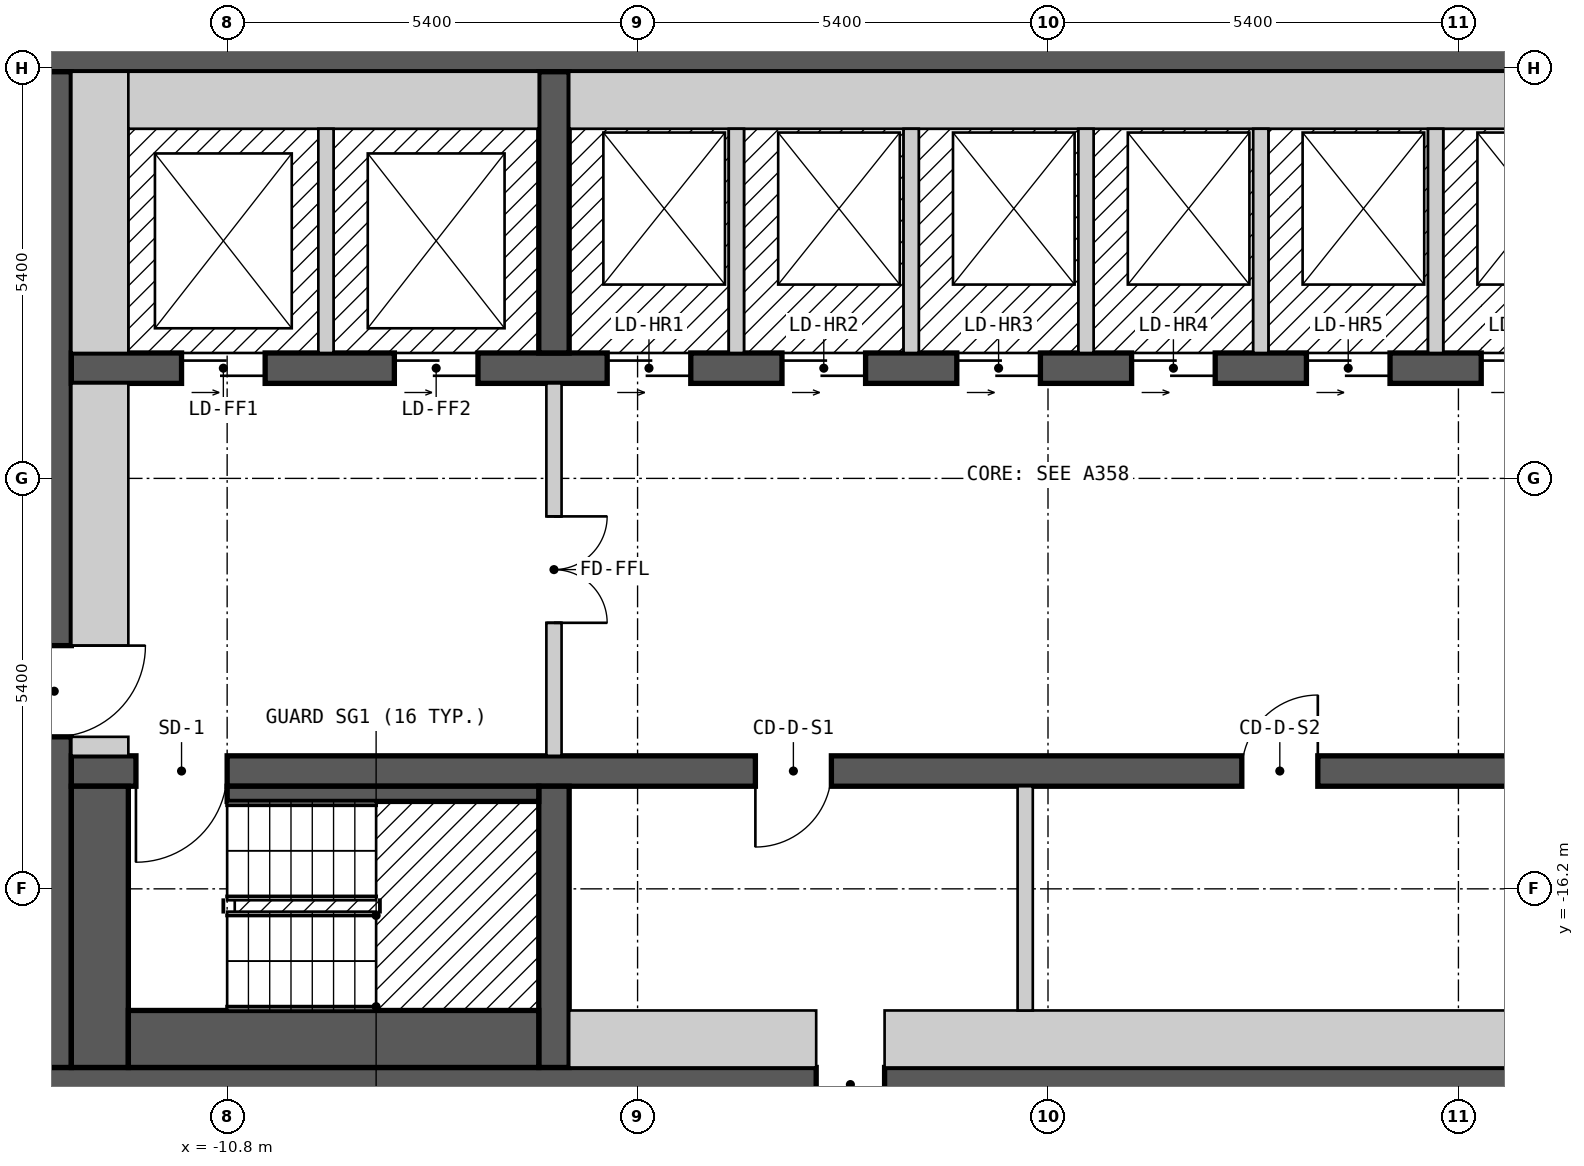
"""IFC4 building model, lengths in metres.
Left out: names, types, materials, properties, quantities, classifications, styles, units other than length and angle.
Written with IfcOpenShell. Run it as: python <this file> out.ifc"""

import sys

from ifc_helpers import new_model, si_unit, direction, frame, frame_2d, origin, place, context, subcontext, project, spatial, polyline, rectangle, outline, extrude, element, fill, save


model = new_model("IFC4")
c1 = context("Model", 3, precision=1e-05, world=origin(), true_north=direction((0.0, 1.0)))
c2 = subcontext(c1, "Body", "Model", "MODEL_VIEW")
j1 = project(units=[si_unit("LENGTHUNIT", "METRE"), si_unit("PLANEANGLEUNIT", "RADIAN")], contexts=[c1])
p1 = place(None, origin())
s1 = spatial("IfcSite", under=j1, at=p1, CompositionType="ELEMENT")
p2 = place(p1, origin())
s2 = spatial("IfcBuilding", under=s1, at=p2, CompositionType="ELEMENT")
p3 = place(p2, frame((0.0, 0.0, 211.8)))
s3 = spatial("IfcBuildingStorey", under=s2, at=p3, CompositionType="ELEMENT", Elevation=211.8)
p4 = place(p3, frame((-13.3, -18.775, 0.0), z_axis=(0.0, 0.0, 1.0), x_axis=(1.0, 0.0, 0.0)))
e1 = element("IfcWall", 1, at=p4, inside=s3, PredefinedType="SHEAR", context=c2, shape_type="SweptSolid", body=[
    extrude(rectangle(XDim=26.6, YDim=0.45, at=frame_2d((13.3, 0.0))), origin(), (0.0, 0.0, 1.0), 2.7),
])
p5 = place(p4, frame((10.25, 0.0, 0.0)))
e2 = element("IfcOpeningElement", 2, at=p5, cuts=e1, PredefinedType="OPENING", context=c2, shape_type="SweptSolid", body=[
    extrude(rectangle(XDim=0.9, YDim=2.1, at=frame_2d((0.45, 1.05))), frame((0.0, 0.235, 0.0), z_axis=(0.0, -1.0, 0.0), x_axis=(1.0, 0.0, 0.0)), (0.0, 0.0, 1.0), 0.47),
])
p6 = place(p3, frame((-13.3, -5.225, 0.0), z_axis=(0.0, 0.0, 1.0), x_axis=(1.0, 0.0, 0.0)))
e3 = element("IfcWall", 3, at=p6, inside=s3, PredefinedType="SHEAR", context=c2, shape_type="SweptSolid", body=[
    extrude(rectangle(XDim=26.6, YDim=0.45, at=frame_2d((13.3, 0.0))), origin(), (0.0, 0.0, 1.0), 2.7),
])
p7 = place(p6, frame((23.65, 0.0, 0.0)))
e4 = element("IfcOpeningElement", 4, at=p7, cuts=e3, PredefinedType="OPENING", context=c2, shape_type="SweptSolid", body=[
    extrude(rectangle(XDim=1.2, YDim=2.1, at=frame_2d((0.6, 1.05))), frame((0.0, 0.235, 0.0), z_axis=(0.0, -1.0, 0.0), x_axis=(1.0, 0.0, 0.0)), (0.0, 0.0, 1.0), 0.47),
])
p8 = place(p3, frame((-13.075, -18.55, 0.0), z_axis=(0.0, 0.0, 1.0), x_axis=(0.0, 1.0, 0.0)))
e5 = element("IfcWall", 5, at=p8, inside=s3, PredefinedType="SHEAR", context=c2, shape_type="SweptSolid", body=[
    extrude(rectangle(XDim=13.1, YDim=0.45, at=frame_2d((6.55, 0.0))), origin(), (0.0, 0.0, 1.0), 2.7),
])
p9 = place(p8, frame((4.35, 0.0, 0.0)))
e6 = element("IfcOpeningElement", 6, at=p9, cuts=e5, PredefinedType="OPENING", context=c2, shape_type="SweptSolid", body=[
    extrude(rectangle(XDim=1.2, YDim=2.1, at=frame_2d((0.6, 1.05))), frame((0.0, 0.235, 0.0), z_axis=(0.0, -1.0, 0.0), x_axis=(1.0, 0.0, 0.0)), (0.0, 0.0, 1.0), 0.47),
])
p10 = place(p3, frame((-12.85, -14.65, 0.0), z_axis=(0.0, 0.0, 1.0), x_axis=(1.0, 0.0, 0.0)))
e7 = element("IfcWall", 7, at=p10, inside=s3, PredefinedType="SHEAR", context=c2, shape_type="SweptSolid", body=[
    extrude(rectangle(XDim=25.7, YDim=0.4, at=frame_2d((12.85, 0.0))), origin(), (0.0, 0.0, 1.0), 2.7),
])
p11 = place(p10, frame((2.05, 0.0, 0.0), z_axis=(0.0, 0.0, 1.0), x_axis=(-1.0, 0.0, 0.0)))
e8 = element("IfcOpeningElement", 8, at=p11, cuts=e7, PredefinedType="OPENING", context=c2, shape_type="SweptSolid", body=[
    extrude(rectangle(XDim=1.2, YDim=2.1, at=frame_2d((0.6, 1.05))), frame((0.0, 0.21, 0.0), z_axis=(0.0, -1.0, 0.0), x_axis=(1.0, 0.0, 0.0)), (0.0, 0.0, 1.0), 0.42),
])
p12 = place(p10, frame((24.9, 0.0, 0.0), z_axis=(0.0, 0.0, 1.0), x_axis=(-1.0, 0.0, 0.0)))
e9 = element("IfcOpeningElement", 9, at=p12, cuts=e7, PredefinedType="OPENING", context=c2, shape_type="SweptSolid", body=[
    extrude(rectangle(XDim=1.2, YDim=2.1, at=frame_2d((0.6, 1.05))), frame((0.0, 0.21, 0.0), z_axis=(0.0, -1.0, 0.0), x_axis=(1.0, 0.0, 0.0)), (0.0, 0.0, 1.0), 0.42),
])
p13 = place(p10, frame((10.0, 0.0, 0.0), z_axis=(0.0, 0.0, 1.0), x_axis=(-1.0, 0.0, 0.0)))
e10 = element("IfcOpeningElement", 10, at=p13, cuts=e7, PredefinedType="OPENING", context=c2, shape_type="SweptSolid", body=[
    extrude(rectangle(XDim=1.0, YDim=2.1, at=frame_2d((0.5, 1.05))), frame((0.0, 0.21, 0.0), z_axis=(0.0, -1.0, 0.0), x_axis=(1.0, 0.0, 0.0)), (0.0, 0.0, 1.0), 0.42),
])
p14 = place(p10, frame((16.4, 0.0, 0.0), z_axis=(0.0, 0.0, 1.0), x_axis=(-1.0, 0.0, 0.0)))
e11 = element("IfcOpeningElement", 11, at=p14, cuts=e7, PredefinedType="OPENING", context=c2, shape_type="SweptSolid", body=[
    extrude(rectangle(XDim=1.0, YDim=2.1, at=frame_2d((0.5, 1.05))), frame((0.0, 0.21, 0.0), z_axis=(0.0, -1.0, 0.0), x_axis=(1.0, 0.0, 0.0)), (0.0, 0.0, 1.0), 0.42),
])
p15 = place(p3, frame((-12.85, -9.35, 0.0), z_axis=(0.0, 0.0, 1.0), x_axis=(1.0, 0.0, 0.0)))
e12 = element("IfcWall", 12, at=p15, inside=s3, PredefinedType="SHEAR", context=c2, shape_type="SweptSolid", body=[
    extrude(rectangle(XDim=23.05, YDim=0.4, at=frame_2d((11.525, 0.0))), origin(), (0.0, 0.0, 1.0), 2.7),
])
p16 = place(p15, frame((1.45, 0.0, 0.0)))
e13 = element("IfcOpeningElement", 13, at=p16, cuts=e12, PredefinedType="OPENING", context=c2, shape_type="SweptSolid", body=[
    extrude(rectangle(XDim=1.1, YDim=2.1, at=frame_2d((0.55, 1.05))), frame((0.0, 0.21, 0.0), z_axis=(0.0, -1.0, 0.0), x_axis=(1.0, 0.0, 0.0)), (0.0, 0.0, 1.0), 0.42),
])
p17 = place(p15, frame((4.25, 0.0, 0.0)))
e14 = element("IfcOpeningElement", 14, at=p17, cuts=e12, PredefinedType="OPENING", context=c2, shape_type="SweptSolid", body=[
    extrude(rectangle(XDim=1.1, YDim=2.1, at=frame_2d((0.55, 1.05))), frame((0.0, 0.21, 0.0), z_axis=(0.0, -1.0, 0.0), x_axis=(1.0, 0.0, 0.0)), (0.0, 0.0, 1.0), 0.42),
])
p18 = place(p15, frame((7.05, 0.0, 0.0)))
e15 = element("IfcOpeningElement", 15, at=p18, cuts=e12, PredefinedType="OPENING", context=c2, shape_type="SweptSolid", body=[
    extrude(rectangle(XDim=1.1, YDim=2.1, at=frame_2d((0.55, 1.05))), frame((0.0, 0.21, 0.0), z_axis=(0.0, -1.0, 0.0), x_axis=(1.0, 0.0, 0.0)), (0.0, 0.0, 1.0), 0.42),
])
p19 = place(p15, frame((9.35, 0.0, 0.0)))
e16 = element("IfcOpeningElement", 16, at=p19, cuts=e12, PredefinedType="OPENING", context=c2, shape_type="SweptSolid", body=[
    extrude(rectangle(XDim=1.1, YDim=2.1, at=frame_2d((0.55, 1.05))), frame((0.0, 0.21, 0.0), z_axis=(0.0, -1.0, 0.0), x_axis=(1.0, 0.0, 0.0)), (0.0, 0.0, 1.0), 0.42),
])
p20 = place(p15, frame((11.65, 0.0, 0.0)))
e17 = element("IfcOpeningElement", 17, at=p20, cuts=e12, PredefinedType="OPENING", context=c2, shape_type="SweptSolid", body=[
    extrude(rectangle(XDim=1.1, YDim=2.1, at=frame_2d((0.55, 1.05))), frame((0.0, 0.21, 0.0), z_axis=(0.0, -1.0, 0.0), x_axis=(1.0, 0.0, 0.0)), (0.0, 0.0, 1.0), 0.42),
])
p21 = place(p15, frame((13.95, 0.0, 0.0)))
e18 = element("IfcOpeningElement", 18, at=p21, cuts=e12, PredefinedType="OPENING", context=c2, shape_type="SweptSolid", body=[
    extrude(rectangle(XDim=1.1, YDim=2.1, at=frame_2d((0.55, 1.05))), frame((0.0, 0.21, 0.0), z_axis=(0.0, -1.0, 0.0), x_axis=(1.0, 0.0, 0.0)), (0.0, 0.0, 1.0), 0.42),
])
p22 = place(p15, frame((16.25, 0.0, 0.0)))
e19 = element("IfcOpeningElement", 19, at=p22, cuts=e12, PredefinedType="OPENING", context=c2, shape_type="SweptSolid", body=[
    extrude(rectangle(XDim=1.1, YDim=2.1, at=frame_2d((0.55, 1.05))), frame((0.0, 0.21, 0.0), z_axis=(0.0, -1.0, 0.0), x_axis=(1.0, 0.0, 0.0)), (0.0, 0.0, 1.0), 0.42),
])
p23 = place(p15, frame((18.55, 0.0, 0.0)))
e20 = element("IfcOpeningElement", 20, at=p23, cuts=e12, PredefinedType="OPENING", context=c2, shape_type="SweptSolid", body=[
    extrude(rectangle(XDim=1.1, YDim=2.1, at=frame_2d((0.55, 1.05))), frame((0.0, 0.21, 0.0), z_axis=(0.0, -1.0, 0.0), x_axis=(1.0, 0.0, 0.0)), (0.0, 0.0, 1.0), 0.42),
])
p24 = place(p15, frame((20.95, 0.0, 0.0)))
e21 = element("IfcOpeningElement", 21, at=p24, cuts=e12, PredefinedType="OPENING", context=c2, shape_type="SweptSolid", body=[
    extrude(rectangle(XDim=1.1, YDim=2.1, at=frame_2d((0.55, 1.05))), frame((0.0, 0.21, 0.0), z_axis=(0.0, -1.0, 0.0), x_axis=(1.0, 0.0, 0.0)), (0.0, 0.0, 1.0), 0.42),
])
for number, where, z_axis, x_axis in (
    (22, (-6.5, -18.55, 0.0), (0.0, 0.0, 1.0), (0.0, 1.0, 0.0)),
    (23, (-6.5, -9.15, 0.0), (0.0, 0.0, 1.0), (0.0, 1.0, 0.0)),
):
    element("IfcWall", number, at=place(p3, frame(where, z_axis=z_axis, x_axis=x_axis)), inside=s3, PredefinedType="SHEAR", context=c2, shape_type="SweptSolid", body=[
        extrude(rectangle(XDim=3.7, YDim=0.4, at=frame_2d((1.85, 0.0))), origin(), (0.0, 0.0, 1.0), 2.7),
    ])
p25 = place(p3, frame((-15.34, -18.37, 0.0), z_axis=(0.0, 0.0, 1.0), x_axis=(0.866022959057, -0.500004234368, 0.0)))
e24 = element("IfcWall", 24, at=p25, inside=s3, PredefinedType="SOLIDWALL", context=c2, shape_type="SweptSolid", body=[
    extrude(outline(polyline([(0.0, -0.15), (5.0, -0.15), (4.92, 0.15), (0.08, 0.15), (0.0, -0.15)])), origin(), (0.0, 0.0, 1.0), 2.7),
])
p26 = place(p25, frame((0.65, 0.0, 0.15)))
e25 = element("IfcOpeningElement", 25, at=p26, cuts=e24, PredefinedType="OPENING", context=c2, shape_type="SweptSolid", body=[
    extrude(rectangle(XDim=1.2, YDim=2.1, at=frame_2d((0.6, 1.05))), frame((0.0, 0.16, 0.0), z_axis=(0.0, -1.0, 0.0), x_axis=(1.0, 0.0, 0.0)), (0.0, 0.0, 1.0), 0.32),
])
p27 = place(p3, frame((-12.475, -18.55, 0.0), z_axis=(0.0, 0.0, 1.0), x_axis=(0.0, 1.0, 0.0)))
e26 = element("IfcWall", 26, at=p27, inside=s3, PredefinedType="SOLIDWALL", context=c2, shape_type="SweptSolid", body=[
    extrude(rectangle(XDim=3.7, YDim=0.75, at=frame_2d((1.85, 0.0))), origin(), (0.0, 0.0, 1.0), 2.7),
])
p28 = place(p3, frame((-12.85, -14.325, 0.0), z_axis=(0.0, 0.0, 1.0), x_axis=(1.0, 0.0, 0.0)))
e27 = element("IfcWall", 27, at=p28, inside=s3, PredefinedType="PARTITIONING", context=c2, shape_type="SweptSolid", body=[
    extrude(rectangle(XDim=0.75, YDim=0.25, at=frame_2d((0.375, 0.0))), origin(), (0.0, 0.0, 1.0), 2.7),
])
p29 = place(p3, frame((-12.475, -13.0, 0.0), z_axis=(0.0, 0.0, 1.0), x_axis=(0.0, 1.0, 0.0)))
e28 = element("IfcWall", 28, at=p29, inside=s3, PredefinedType="PARTITIONING", context=c2, shape_type="SweptSolid", body=[
    extrude(rectangle(XDim=3.45, YDim=0.75, at=frame_2d((1.725, 0.0))), origin(), (0.0, 0.0, 1.0), 2.7),
])
p30 = place(p3, frame((-12.475, -9.15, 0.0), z_axis=(0.0, 0.0, 1.0), x_axis=(0.0, 1.0, 0.0)))
e29 = element("IfcWall", 29, at=p30, inside=s3, PredefinedType="SOLIDWALL", context=c2, shape_type="SweptSolid", body=[
    extrude(rectangle(XDim=3.7, YDim=0.75, at=frame_2d((1.85, 0.0))), origin(), (0.0, 0.0, 1.0), 2.7),
])
for number, where, z_axis, x_axis in (
    (30, (-12.1, -18.175, 0.0), (0.0, 0.0, 1.0), (1.0, 0.0, 0.0)),
    (31, (-12.1, -5.825, 0.0), (0.0, 0.0, 1.0), (1.0, 0.0, 0.0)),
):
    element("IfcWall", number, at=place(p3, frame(where, z_axis=z_axis, x_axis=x_axis)), inside=s3, PredefinedType="SOLIDWALL", context=c2, shape_type="SweptSolid", body=[
        extrude(rectangle(XDim=5.4, YDim=0.75, at=frame_2d((2.7, 0.0))), origin(), (0.0, 0.0, 1.0), 2.7),
    ])
p31 = place(p3, frame((-10.8, -14.95, 0.0), z_axis=(0.0, 0.0, 1.0), x_axis=(1.0, 0.0, 0.0)))
e32 = element("IfcWall", 32, at=p31, inside=s3, PredefinedType="SOLIDWALL", context=c2, shape_type="SweptSolid", body=[
    extrude(rectangle(XDim=4.1, YDim=0.2, at=frame_2d((2.05, 0.0))), origin(), (0.0, 0.0, 1.0), 2.7),
])
p32 = place(p3, frame((-9.5, -9.15, 0.0), z_axis=(0.0, 0.0, 1.0), x_axis=(0.0, 1.0, 0.0)))
e33 = element("IfcWall", 33, at=p32, inside=s3, PredefinedType="SOLIDWALL", context=c2, shape_type="SweptSolid", body=[
    extrude(rectangle(XDim=2.95, YDim=0.2, at=frame_2d((1.475, 0.0))), origin(), (0.0, 0.0, 1.0), 2.7),
])
p33 = place(p3, frame((-6.5, -14.45, 0.0), z_axis=(0.0, 0.0, 1.0), x_axis=(0.0, 1.0, 0.0)))
e34 = element("IfcWall", 34, at=p33, inside=s3, PredefinedType="PARTITIONING", context=c2, shape_type="SweptSolid", body=[
    extrude(rectangle(XDim=4.9, YDim=0.2, at=frame_2d((2.45, 0.0))), origin(), (0.0, 0.0, 1.0), 2.7),
])
p34 = place(p33, frame((3.15, 0.0, 0.0), z_axis=(0.0, 0.0, 1.0), x_axis=(-1.0, 0.0, 0.0)))
e35 = element("IfcOpeningElement", 35, at=p34, cuts=e34, PredefinedType="OPENING", context=c2, shape_type="SweptSolid", body=[
    extrude(rectangle(XDim=1.4, YDim=2.1, at=frame_2d((0.7, 1.05))), frame((0.0, 0.11, 0.0), z_axis=(0.0, -1.0, 0.0), x_axis=(1.0, 0.0, 0.0)), (0.0, 0.0, 1.0), 0.22),
])
p35 = place(p3, frame((-6.3, -18.175, 0.0), z_axis=(0.0, 0.0, 1.0), x_axis=(1.0, 0.0, 0.0)))
e36 = element("IfcWall", 36, at=p35, inside=s3, PredefinedType="PARTITIONING", context=c2, shape_type="SweptSolid", body=[
    extrude(rectangle(XDim=3.25, YDim=0.75, at=frame_2d((1.625, 0.0))), origin(), (0.0, 0.0, 1.0), 2.7),
])
p36 = place(p3, frame((-6.3, -5.825, 0.0), z_axis=(0.0, 0.0, 1.0), x_axis=(1.0, 0.0, 0.0)))
e37 = element("IfcWall", 37, at=p36, inside=s3, PredefinedType="SOLIDWALL", context=c2, shape_type="SweptSolid", body=[
    extrude(rectangle(XDim=16.1, YDim=0.75, at=frame_2d((8.05, 0.0))), origin(), (0.0, 0.0, 1.0), 2.7),
])
p37 = place(p3, frame((-4.1, -9.15, 0.0), z_axis=(0.0, 0.0, 1.0), x_axis=(0.0, 1.0, 0.0)))
e38 = element("IfcWall", 38, at=p37, inside=s3, PredefinedType="SOLIDWALL", context=c2, shape_type="SweptSolid", body=[
    extrude(rectangle(XDim=2.95, YDim=0.2, at=frame_2d((1.475, 0.0))), origin(), (0.0, 0.0, 1.0), 2.7),
])
p38 = place(p3, frame((-2.15, -18.175, 0.0), z_axis=(0.0, 0.0, 1.0), x_axis=(1.0, 0.0, 0.0)))
e39 = element("IfcWall", 39, at=p38, inside=s3, PredefinedType="PARTITIONING", context=c2, shape_type="SweptSolid", body=[
    extrude(rectangle(XDim=8.45, YDim=0.75, at=frame_2d((4.225, 0.0))), origin(), (0.0, 0.0, 1.0), 2.7),
])
p39 = place(p3, frame((-1.8, -9.15, 0.0), z_axis=(0.0, 0.0, 1.0), x_axis=(0.0, 1.0, 0.0)))
e40 = element("IfcWall", 40, at=p39, inside=s3, PredefinedType="SOLIDWALL", context=c2, shape_type="SweptSolid", body=[
    extrude(rectangle(XDim=2.95, YDim=0.2, at=frame_2d((1.475, 0.0))), origin(), (0.0, 0.0, 1.0), 2.7),
])
p40 = place(p3, frame((-0.3, -17.8, 0.0), z_axis=(0.0, 0.0, 1.0), x_axis=(0.0, 1.0, 0.0)))
e41 = element("IfcWall", 41, at=p40, inside=s3, PredefinedType="PARTITIONING", context=c2, shape_type="SweptSolid", body=[
    extrude(rectangle(XDim=2.95, YDim=0.2, at=frame_2d((1.475, 0.0))), origin(), (0.0, 0.0, 1.0), 2.7),
])
for number, where, z_axis, x_axis in (
    (42, (0.5, -9.15, 0.0), (0.0, 0.0, 1.0), (0.0, 1.0, 0.0)),
    (43, (2.8, -9.15, 0.0), (0.0, 0.0, 1.0), (0.0, 1.0, 0.0)),
    (44, (5.1, -9.15, 0.0), (0.0, 0.0, 1.0), (0.0, 1.0, 0.0)),
):
    element("IfcWall", number, at=place(p3, frame(where, z_axis=z_axis, x_axis=x_axis)), inside=s3, PredefinedType="SOLIDWALL", context=c2, shape_type="SweptSolid", body=[
        extrude(rectangle(XDim=2.95, YDim=0.2, at=frame_2d((1.475, 0.0))), origin(), (0.0, 0.0, 1.0), 2.7),
    ])
p41 = place(p16, origin())
e45 = element("IfcDoor", 45, at=p41, inside=s3, OperationType="DOUBLE_DOOR_SLIDING", PredefinedType="DOOR", context=c2, shape_type="SweptSolid", body=[
    extrude(rectangle(XDim=1.1, YDim=2.1, at=frame_2d((0.55, 1.05))), frame((0.0, 0.025, 0.0), z_axis=(0.0, -1.0, 0.0), x_axis=(1.0, 0.0, 0.0)), (0.0, 0.0, 1.0), 0.05),
])
fill(e13, e45)
p42 = place(p17, origin())
e46 = element("IfcDoor", 46, at=p42, inside=s3, OperationType="DOUBLE_DOOR_SLIDING", PredefinedType="DOOR", context=c2, shape_type="SweptSolid", body=[
    extrude(rectangle(XDim=1.1, YDim=2.1, at=frame_2d((0.55, 1.05))), frame((0.0, 0.025, 0.0), z_axis=(0.0, -1.0, 0.0), x_axis=(1.0, 0.0, 0.0)), (0.0, 0.0, 1.0), 0.05),
])
fill(e14, e46)
p43 = place(p18, origin())
e47 = element("IfcDoor", 47, at=p43, inside=s3, OperationType="DOUBLE_DOOR_SLIDING", PredefinedType="DOOR", context=c2, shape_type="SweptSolid", body=[
    extrude(rectangle(XDim=1.1, YDim=2.1, at=frame_2d((0.55, 1.05))), frame((0.0, 0.025, 0.0), z_axis=(0.0, -1.0, 0.0), x_axis=(1.0, 0.0, 0.0)), (0.0, 0.0, 1.0), 0.05),
])
fill(e15, e47)
p44 = place(p19, origin())
e48 = element("IfcDoor", 48, at=p44, inside=s3, OperationType="DOUBLE_DOOR_SLIDING", PredefinedType="DOOR", context=c2, shape_type="SweptSolid", body=[
    extrude(rectangle(XDim=1.1, YDim=2.1, at=frame_2d((0.55, 1.05))), frame((0.0, 0.025, 0.0), z_axis=(0.0, -1.0, 0.0), x_axis=(1.0, 0.0, 0.0)), (0.0, 0.0, 1.0), 0.05),
])
fill(e16, e48)
p45 = place(p20, origin())
e49 = element("IfcDoor", 49, at=p45, inside=s3, OperationType="DOUBLE_DOOR_SLIDING", PredefinedType="DOOR", context=c2, shape_type="SweptSolid", body=[
    extrude(rectangle(XDim=1.1, YDim=2.1, at=frame_2d((0.55, 1.05))), frame((0.0, 0.025, 0.0), z_axis=(0.0, -1.0, 0.0), x_axis=(1.0, 0.0, 0.0)), (0.0, 0.0, 1.0), 0.05),
])
fill(e17, e49)
p46 = place(p21, origin())
e50 = element("IfcDoor", 50, at=p46, inside=s3, OperationType="DOUBLE_DOOR_SLIDING", PredefinedType="DOOR", context=c2, shape_type="SweptSolid", body=[
    extrude(rectangle(XDim=1.1, YDim=2.1, at=frame_2d((0.55, 1.05))), frame((0.0, 0.025, 0.0), z_axis=(0.0, -1.0, 0.0), x_axis=(1.0, 0.0, 0.0)), (0.0, 0.0, 1.0), 0.05),
])
fill(e18, e50)
p47 = place(p22, origin())
e51 = element("IfcDoor", 51, at=p47, inside=s3, OperationType="DOUBLE_DOOR_SLIDING", PredefinedType="DOOR", context=c2, shape_type="SweptSolid", body=[
    extrude(rectangle(XDim=1.1, YDim=2.1, at=frame_2d((0.55, 1.05))), frame((0.0, 0.025, 0.0), z_axis=(0.0, -1.0, 0.0), x_axis=(1.0, 0.0, 0.0)), (0.0, 0.0, 1.0), 0.05),
])
fill(e19, e51)
p48 = place(p23, origin())
e52 = element("IfcDoor", 52, at=p48, inside=s3, OperationType="DOUBLE_DOOR_SLIDING", PredefinedType="DOOR", context=c2, shape_type="SweptSolid", body=[
    extrude(rectangle(XDim=1.1, YDim=2.1, at=frame_2d((0.55, 1.05))), frame((0.0, 0.025, 0.0), z_axis=(0.0, -1.0, 0.0), x_axis=(1.0, 0.0, 0.0)), (0.0, 0.0, 1.0), 0.05),
])
fill(e20, e52)
p49 = place(p11, origin())
e53 = element("IfcDoor", 53, at=p49, inside=s3, OperationType="SINGLE_SWING_RIGHT", PredefinedType="DOOR", context=c2, shape_type="SweptSolid", body=[
    extrude(rectangle(XDim=1.2, YDim=2.1, at=frame_2d((0.6, 1.05))), frame((0.0, 0.025, 0.0), z_axis=(0.0, -1.0, 0.0), x_axis=(1.0, 0.0, 0.0)), (0.0, 0.0, 1.0), 0.05),
])
fill(e8, e53)
p50 = place(p9, origin())
e54 = element("IfcDoor", 54, at=p50, inside=s3, OperationType="SINGLE_SWING_RIGHT", PredefinedType="DOOR", context=c2, shape_type="SweptSolid", body=[
    extrude(rectangle(XDim=1.2, YDim=2.1, at=frame_2d((0.6, 1.05))), frame((0.0, 0.025, 0.0), z_axis=(0.0, -1.0, 0.0), x_axis=(1.0, 0.0, 0.0)), (0.0, 0.0, 1.0), 0.05),
])
fill(e6, e54)
p51 = place(p34, origin())
e55 = element("IfcDoor", 55, at=p51, inside=s3, OperationType="DOUBLE_DOOR_SINGLE_SWING", PredefinedType="DOOR", context=c2, shape_type="SweptSolid", body=[
    extrude(rectangle(XDim=1.4, YDim=2.1, at=frame_2d((0.7, 1.05))), frame((0.0, 0.025, 0.0), z_axis=(0.0, -1.0, 0.0), x_axis=(1.0, 0.0, 0.0)), (0.0, 0.0, 1.0), 0.05),
])
fill(e35, e55)
p52 = place(p13, origin())
e56 = element("IfcDoor", 56, at=p52, inside=s3, OperationType="SINGLE_SWING_RIGHT", PredefinedType="DOOR", context=c2, shape_type="SweptSolid", body=[
    extrude(rectangle(XDim=1.0, YDim=2.1, at=frame_2d((0.5, 1.05))), frame((0.0, 0.025, 0.0), z_axis=(0.0, -1.0, 0.0), x_axis=(1.0, 0.0, 0.0)), (0.0, 0.0, 1.0), 0.05),
])
fill(e10, e56)
p53 = place(p14, origin())
e57 = element("IfcDoor", 57, at=p53, inside=s3, OperationType="SINGLE_SWING_LEFT", PredefinedType="DOOR", context=c2, shape_type="SweptSolid", body=[
    extrude(rectangle(XDim=1.0, YDim=2.1, at=frame_2d((0.5, 1.05))), frame((0.0, 0.025, 0.0), z_axis=(0.0, -1.0, 0.0), x_axis=(1.0, 0.0, 0.0)), (0.0, 0.0, 1.0), 0.05),
])
fill(e11, e57)
p54 = place(p5, origin())
e58 = element("IfcDoor", 58, at=p54, inside=s3, OperationType="SINGLE_SWING_RIGHT", PredefinedType="DOOR", context=c2, shape_type="SweptSolid", body=[
    extrude(rectangle(XDim=0.9, YDim=2.1, at=frame_2d((0.45, 1.05))), frame((0.0, 0.025, 0.0), z_axis=(0.0, -1.0, 0.0), x_axis=(1.0, 0.0, 0.0)), (0.0, 0.0, 1.0), 0.05),
])
fill(e2, e58)
save(model, sys.argv[1])
